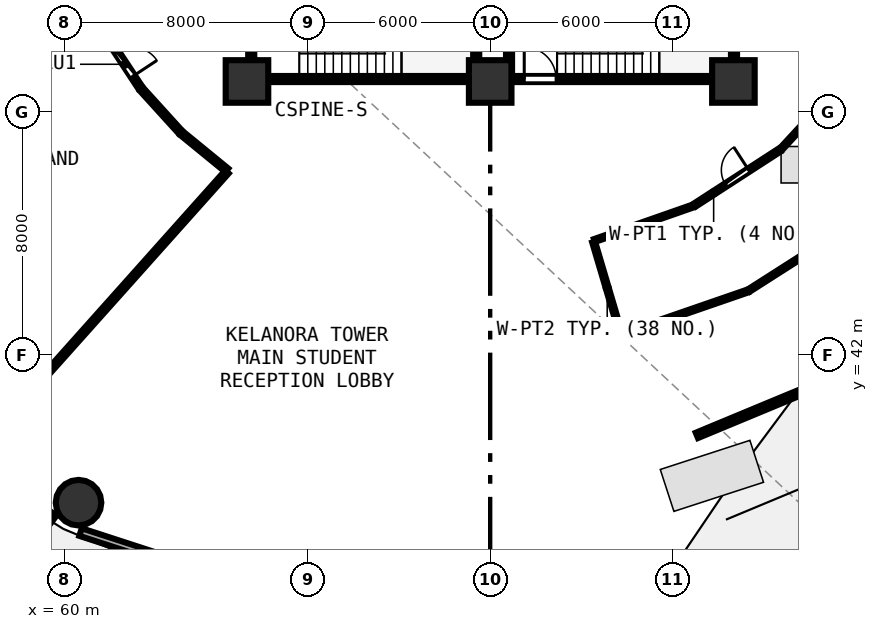
"""IFC4 building model, lengths in metres.
Left out: names, types, materials, properties, quantities, classifications, styles, units other than length and angle.
Written with IfcOpenShell. Run it as: python <this file> out.ifc"""

import sys

from ifc_helpers import new_model, si_unit, direction, frame, frame_2d, origin, origin_2d, place, context, subcontext, project, spatial, rectangle, circle, extrude, element, fill, save


model = new_model("IFC4")
c1 = context("Model", 3, precision=1e-05, world=origin(), true_north=direction((0.0, 1.0)))
c2 = subcontext(c1, "Body", "Model", "MODEL_VIEW")
j1 = project(units=[si_unit("LENGTHUNIT", "METRE"), si_unit("PLANEANGLEUNIT", "RADIAN")], contexts=[c1])
p1 = place(None, origin())
s1 = spatial("IfcSite", under=j1, at=p1, CompositionType="ELEMENT")
p2 = place(p1, origin())
s2 = spatial("IfcBuilding", under=s1, at=p2, CompositionType="ELEMENT")
p3 = place(p2, origin())
s3 = spatial("IfcBuildingStorey", under=s2, at=p3, CompositionType="ELEMENT", Elevation=0.0)
for number, where, z_axis, x_axis in (
    (1, (66.0, 51.0, 0.0), (0.0, 0.0, 1.0), (1.0, 0.0, 0.0)),
    (2, (74.0, 51.0, 0.0), (0.0, 0.0, 1.0), (1.0, 0.0, 0.0)),
    (3, (82.0, 51.0, 0.0), (0.0, 0.0, 1.0), (1.0, 0.0, 0.0)),
):
    element("IfcColumn", number, at=place(p3, frame(where, z_axis=z_axis, x_axis=x_axis)), inside=s3, PredefinedType="PILASTER", context=c2, shape_type="SweptSolid", body=[
        extrude(rectangle(XDim=1.4, YDim=1.4, at=origin_2d()), origin(), (0.0, 0.0, 1.0), 4.5),
    ])
p4 = place(p3, frame((60.46, 37.146, 0.0), z_axis=(0.0, 0.0, 1.0), x_axis=(1.0, 0.0, 0.0)))
e4 = element("IfcColumn", 4, at=p4, inside=s3, PredefinedType="COLUMN", context=c2, shape_type="SweptSolid", body=[
    extrude(circle(Radius=0.75, at=origin_2d()), origin(), (0.0, 0.0, 1.0), 4.5),
])
p5 = place(p3, frame((53.016, 41.582, 0.0), z_axis=(0.0, 0.0, 1.0), x_axis=(0.80030733173, -0.599590005569, 0.0)))
e5 = element("IfcWall", 5, at=p5, inside=s3, PredefinedType="SOLIDWALL", context=c2, shape_type="SweptSolid", body=[
    extrude(rectangle(XDim=8.291, YDim=0.26, at=frame_2d((4.145, 0.0))), origin(), (0.0, 0.0, 1.0), 4.185),
])
p6 = place(p5, frame((2.945, 0.0, 0.0)))
e6 = element("IfcOpeningElement", 6, at=p6, cuts=e5, PredefinedType="OPENING", context=c2, shape_type="SweptSolid", body=[
    extrude(rectangle(XDim=2.4, YDim=2.35, at=frame_2d((1.2, 1.175))), frame((0.0, 0.14, 0.0), z_axis=(0.0, -1.0, 0.0), x_axis=(1.0, 0.0, 0.0)), (0.0, 0.0, 1.0), 0.28),
])
p7 = place(p3, frame((60.526, 36.178, 0.0), z_axis=(0.0, 0.0, 1.0), x_axis=(0.951039914291, -0.309068085421, 0.0)))
e7 = element("IfcWall", 7, at=p7, inside=s3, PredefinedType="SOLIDWALL", context=c2, shape_type="SweptSolid", body=[
    extrude(rectangle(XDim=8.594, YDim=0.26, at=frame_2d((4.297, 0.0))), origin(), (0.0, 0.0, 1.0), 4.185),
])
p8 = place(p7, frame((3.097, 0.0, 0.0)))
e8 = element("IfcOpeningElement", 8, at=p8, cuts=e7, PredefinedType="OPENING", context=c2, shape_type="SweptSolid", body=[
    extrude(rectangle(XDim=2.4, YDim=2.35, at=frame_2d((1.2, 1.175))), frame((0.0, 0.14, 0.0), z_axis=(0.0, -1.0, 0.0), x_axis=(1.0, 0.0, 0.0)), (0.0, 0.0, 1.0), 0.28),
])
p9 = place(p3, frame((80.798, 39.359, 0.0), z_axis=(0.0, 0.0, 1.0), x_axis=(0.923474464617, 0.383659892614, 0.0)))
e9 = element("IfcWall", 9, at=p9, inside=s3, PredefinedType="PARAPET", context=c2, shape_type="SweptSolid", body=[
    extrude(rectangle(XDim=5.263, YDim=0.19, at=frame_2d((2.631, 0.0))), origin(), (0.0, 0.0, 1.0), 0.62),
])
p10 = place(p3, frame((74.0, 51.08, 0.0), z_axis=(0.0, 0.0, 1.0), x_axis=(1.0, 0.0, 0.0)))
e10 = element("IfcWall", 10, at=p10, inside=s3, PredefinedType="SHEAR", context=c2, shape_type="SweptSolid", body=[
    extrude(rectangle(XDim=7.9, YDim=0.2, at=frame_2d((3.95, 0.0))), origin(), (0.0, 0.0, 1.0), 4.2),
])
p11 = place(p10, frame((1.12, 0.0, 0.0)))
e11 = element("IfcOpeningElement", 11, at=p11, cuts=e10, PredefinedType="OPENING", context=c2, shape_type="SweptSolid", body=[
    extrude(rectangle(XDim=1.05, YDim=2.1, at=frame_2d((0.525, 1.05))), frame((0.0, 0.11, 0.0), z_axis=(0.0, -1.0, 0.0), x_axis=(1.0, 0.0, 0.0)), (0.0, 0.0, 1.0), 0.22),
])
for number, where, z_axis, x_axis in (
    (12, (82.02, 51.2, 0.0), (0.0, 0.0, 1.0), (0.0, 1.0, 0.0)),
    (13, (74.62, 54.27, 0.0), (0.0, 0.0, 1.0), (0.0, -1.0, 0.0)),
):
    element("IfcWall", number, at=place(p3, frame(where, z_axis=z_axis, x_axis=x_axis)), inside=s3, PredefinedType="SHEAR", context=c2, shape_type="SweptSolid", body=[
        extrude(rectangle(XDim=3.07, YDim=0.2, at=frame_2d((1.535, 0.0))), origin(), (0.0, 0.0, 1.0), 4.2),
    ])
p12 = place(p3, frame((66.26, 51.08, 0.0), z_axis=(0.0, 0.0, 1.0), x_axis=(1.0, 0.0, 0.0)))
e14 = element("IfcWall", 14, at=p12, inside=s3, PredefinedType="SHEAR", context=c2, shape_type="SweptSolid", body=[
    extrude(rectangle(XDim=7.16, YDim=0.2, at=frame_2d((3.58, 0.0))), origin(), (0.0, 0.0, 1.0), 4.2),
])
p13 = place(p3, frame((73.54, 51.2, 0.0), z_axis=(0.0, 0.0, 1.0), x_axis=(0.0, 1.0, 0.0)))
e15 = element("IfcWall", 15, at=p13, inside=s3, PredefinedType="SHEAR", context=c2, shape_type="SweptSolid", body=[
    extrude(rectangle(XDim=3.07, YDim=0.2, at=frame_2d((1.535, 0.0))), origin(), (0.0, 0.0, 1.0), 4.2),
])
p14 = place(p3, frame((66.14, 54.27, 0.0), z_axis=(0.0, 0.0, 1.0), x_axis=(0.0, -1.0, 0.0)))
e16 = element("IfcWall", 16, at=p14, inside=s3, PredefinedType="SHEAR", context=c2, shape_type="SweptSolid", body=[
    extrude(rectangle(XDim=3.07, YDim=0.2, at=frame_2d((1.535, 0.0))), origin(), (0.0, 0.0, 1.0), 4.2),
])
p15 = place(p14, frame((1.01, 0.0, 0.0)))
e17 = element("IfcOpeningElement", 17, at=p15, cuts=e16, PredefinedType="OPENING", context=c2, shape_type="SweptSolid", body=[
    extrude(rectangle(XDim=1.05, YDim=2.1, at=frame_2d((0.525, 1.05))), frame((0.0, 0.11, 0.0), z_axis=(0.0, -1.0, 0.0), x_axis=(1.0, 0.0, 0.0)), (0.0, 0.0, 1.0), 0.22),
])
p16 = place(p3, frame((61.486, 52.319, 0.0), z_axis=(0.0, 0.0, 1.0), x_axis=(0.551109461678, -0.834432957912, 0.0)))
e18 = element("IfcWall", 18, at=p16, inside=s3, PredefinedType="PARTITIONING", context=c2, shape_type="SweptSolid", body=[
    extrude(rectangle(XDim=1.807, YDim=0.15, at=frame_2d((0.903, 0.0))), origin(), (0.0, 0.0, 1.0), 3.585),
])
p17 = place(p16, frame((0.428, 0.0, 0.0)))
e19 = element("IfcOpeningElement", 19, at=p17, cuts=e18, PredefinedType="OPENING", context=c2, shape_type="SweptSolid", body=[
    extrude(rectangle(XDim=0.95, YDim=2.08, at=frame_2d((0.475, 1.04))), frame((0.0, 0.085, 0.0), z_axis=(0.0, -1.0, 0.0), x_axis=(1.0, 0.0, 0.0)), (0.0, 0.0, 1.0), 0.17),
])
p18 = place(p3, frame((80.74, 46.942, 0.0), z_axis=(0.0, 0.0, 1.0), x_axis=(0.839224842152, 0.543784575282, 0.0)))
e20 = element("IfcWall", 20, at=p18, inside=s3, PredefinedType="PARTITIONING", context=c2, shape_type="SweptSolid", body=[
    extrude(rectangle(XDim=3.302, YDim=0.12, at=frame_2d((1.651, 0.0))), origin(), (0.0, 0.0, 1.0), 3.585),
])
p19 = place(p18, frame((1.201, 0.0, 0.0)))
e21 = element("IfcOpeningElement", 21, at=p19, cuts=e20, PredefinedType="OPENING", context=c2, shape_type="SweptSolid", body=[
    extrude(rectangle(XDim=0.9, YDim=2.08, at=frame_2d((0.45, 1.04))), frame((0.0, 0.07, 0.0), z_axis=(0.0, -1.0, 0.0), x_axis=(1.0, 0.0, 0.0)), (0.0, 0.0, 1.0), 0.14),
])
p20 = place(p3, frame((62.542, 50.731, 0.0), z_axis=(0.0, 0.0, 1.0), x_axis=(0.672186822345, -0.740381574505, 0.0)))
e22 = element("IfcWall", 22, at=p20, inside=s3, PredefinedType="PARTITIONING", context=c2, shape_type="SweptSolid", body=[
    extrude(rectangle(XDim=1.876, YDim=0.15, at=frame_2d((0.938, 0.0))), origin(), (0.0, 0.0, 1.0), 3.585),
])
p21 = place(p3, frame((63.861, 49.288, 0.0), z_axis=(0.0, 0.0, 1.0), x_axis=(0.774014344512, -0.633168061805, 0.0)))
e23 = element("IfcWall", 23, at=p21, inside=s3, PredefinedType="PARTITIONING", context=c2, shape_type="SweptSolid", body=[
    extrude(rectangle(XDim=1.907, YDim=0.15, at=frame_2d((0.953, 0.0))), origin(), (0.0, 0.0, 1.0), 3.585),
])
p22 = place(p3, frame((65.341, 48.025, 0.0), z_axis=(0.0, 0.0, 1.0), x_axis=(-0.666165058958, -0.745804340443, 0.0)))
e24 = element("IfcWall", 24, at=p22, inside=s3, PredefinedType="PARTITIONING", context=c2, shape_type="SweptSolid", body=[
    extrude(rectangle(XDim=8.774, YDim=0.15, at=frame_2d((4.387, 0.0))), origin(), (0.0, 0.0, 1.0), 3.585),
])
p23 = place(p3, frame((77.43, 45.768, 0.0), z_axis=(0.0, 0.0, 1.0), x_axis=(0.943895142086, 0.330245303898, 0.0)))
e25 = element("IfcWall", 25, at=p23, inside=s3, PredefinedType="PARTITIONING", context=c2, shape_type="SweptSolid", body=[
    extrude(rectangle(XDim=3.414, YDim=0.1, at=frame_2d((1.707, 0.0))), origin(), (0.0, 0.0, 1.0), 4.19),
])
p24 = place(p3, frame((83.589, 48.799, 0.0), z_axis=(0.0, 0.0, 1.0), x_axis=(0.678488862619, 0.734610688257, 0.0)))
e26 = element("IfcWall", 26, at=p24, inside=s3, PredefinedType="PARTITIONING", context=c2, shape_type="SweptSolid", body=[
    extrude(rectangle(XDim=3.254, YDim=0.1, at=frame_2d((1.627, 0.0))), origin(), (0.0, 0.0, 1.0), 3.585),
])
p25 = place(p3, frame((86.106, 46.424, 0.0), z_axis=(0.0, 0.0, 1.0), x_axis=(-0.842680324252, -0.538414218905, 0.0)))
e27 = element("IfcWall", 27, at=p25, inside=s3, PredefinedType="PARTITIONING", context=c2, shape_type="SweptSolid", body=[
    extrude(rectangle(XDim=4.248, YDim=0.1, at=frame_2d((2.124, 0.0))), origin(), (0.0, 0.0, 1.0), 3.585),
])
p26 = place(p3, frame((82.455, 44.102, 0.0), z_axis=(0.0, 0.0, 1.0), x_axis=(-0.945232717828, -0.326397164737, 0.0)))
e28 = element("IfcWall", 28, at=p26, inside=s3, PredefinedType="PARTITIONING", context=c2, shape_type="SweptSolid", body=[
    extrude(rectangle(XDim=4.35, YDim=0.1, at=frame_2d((2.175, 0.0))), origin(), (0.0, 0.0, 1.0), 3.585),
])
p27 = place(p3, frame((78.295, 42.708, 0.0), z_axis=(0.0, 0.0, 1.0), x_axis=(-0.284027408145, 0.958816161432, 0.0)))
e29 = element("IfcWall", 29, at=p27, inside=s3, PredefinedType="PARTITIONING", context=c2, shape_type="SweptSolid", body=[
    extrude(rectangle(XDim=3.138, YDim=0.1, at=frame_2d((1.569, 0.0))), origin(), (0.0, 0.0, 1.0), 3.945),
])
p28 = place(p11, origin())
e30 = element("IfcDoor", 30, at=p28, inside=s3, OperationType="SINGLE_SWING_LEFT", PredefinedType="DOOR", context=c2, shape_type="SweptSolid", body=[
    extrude(rectangle(XDim=1.05, YDim=2.1, at=frame_2d((0.525, 1.05))), frame((0.0, 0.025, 0.0), z_axis=(0.0, -1.0, 0.0), x_axis=(1.0, 0.0, 0.0)), (0.0, 0.0, 1.0), 0.05),
])
fill(e11, e30)
p29 = place(p17, origin())
e31 = element("IfcDoor", 31, at=p29, inside=s3, OperationType="SINGLE_SWING_RIGHT", PredefinedType="DOOR", context=c2, shape_type="SweptSolid", body=[
    extrude(rectangle(XDim=0.95, YDim=2.08, at=frame_2d((0.475, 1.04))), frame((0.0, 0.025, 0.0), z_axis=(0.0, -1.0, 0.0), x_axis=(1.0, 0.0, 0.0)), (0.0, 0.0, 1.0), 0.05),
])
fill(e19, e31)
p30 = place(p19, origin())
e32 = element("IfcDoor", 32, at=p30, inside=s3, OperationType="SINGLE_SWING_RIGHT", PredefinedType="DOOR", context=c2, shape_type="SweptSolid", body=[
    extrude(rectangle(XDim=0.9, YDim=2.08, at=frame_2d((0.45, 1.04))), frame((0.0, 0.025, 0.0), z_axis=(0.0, -1.0, 0.0), x_axis=(1.0, 0.0, 0.0)), (0.0, 0.0, 1.0), 0.05),
])
fill(e21, e32)
save(model, sys.argv[1])
